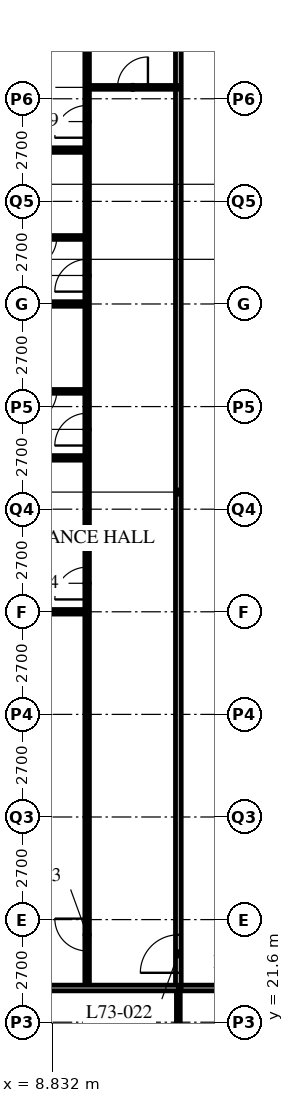
"""IFC4 building model, lengths in metres.
Left out: names, types, materials, properties, quantities, classifications, styles, units other than length and angle.
Written with IfcOpenShell. Run it as: python <this file> out.ifc"""

import sys

from ifc_helpers import new_model, si_unit, direction, frame, frame_2d, origin, place, context, subcontext, project, spatial, rectangle, extrude, element, fill, save


model = new_model("IFC4")
c1 = context("Model", 3, precision=1e-05, world=origin(), true_north=direction((0.0, 1.0)))
c2 = subcontext(c1, "Body", "Model", "MODEL_VIEW")
j1 = project(units=[si_unit("LENGTHUNIT", "METRE"), si_unit("PLANEANGLEUNIT", "RADIAN")], contexts=[c1])
p1 = place(None, origin())
s1 = spatial("IfcSite", under=j1, at=p1, CompositionType="ELEMENT")
p2 = place(p1, origin())
s2 = spatial("IfcBuilding", under=s1, at=p2, CompositionType="ELEMENT")
p3 = place(p2, frame((0.0, 0.0, 285.3)))
s3 = spatial("IfcBuildingStorey", under=s2, at=p3, CompositionType="ELEMENT", Elevation=285.3)
p4 = place(p3, frame((12.15, 22.5, 0.0), z_axis=(0.0, 0.0, 1.0), x_axis=(1.0, 0.0, 0.0)))
e1 = element("IfcWall", 1, at=p4, inside=s3, PredefinedType="PARTITIONING", context=c2, shape_type="SweptSolid", body=[
    extrude(rectangle(XDim=24.3, YDim=0.15, at=frame_2d((12.15, 0.0))), origin(), (0.0, 0.0, 1.0), 3.69),
])
p5 = place(p4, frame((4.45, 0.0, 0.0)))
e2 = element("IfcOpeningElement", 2, at=p5, cuts=e1, PredefinedType="OPENING", context=c2, shape_type="SweptSolid", body=[
    extrude(rectangle(XDim=1.0, YDim=2.1, at=frame_2d((0.5, 1.05))), frame((0.0, 0.085, 0.0), z_axis=(0.0, -1.0, 0.0), x_axis=(1.0, 0.0, 0.0)), (0.0, 0.0, 1.0), 0.17),
])
p6 = place(p4, frame((22.6, 0.0, 0.0)))
e3 = element("IfcOpeningElement", 3, at=p6, cuts=e1, PredefinedType="OPENING", context=c2, shape_type="SweptSolid", body=[
    extrude(rectangle(XDim=1.0, YDim=2.1, at=frame_2d((0.5, 1.05))), frame((0.0, 0.085, 0.0), z_axis=(0.0, -1.0, 0.0), x_axis=(1.0, 0.0, 0.0)), (0.0, 0.0, 1.0), 0.17),
])
p7 = place(p4, frame((2.625, 0.0, 0.0)))
e4 = element("IfcOpeningElement", 4, at=p7, cuts=e1, PredefinedType="OPENING", context=c2, shape_type="SweptSolid", body=[
    extrude(rectangle(XDim=1.0, YDim=2.1, at=frame_2d((0.5, 1.05))), frame((0.0, 0.085, 0.0), z_axis=(0.0, -1.0, 0.0), x_axis=(1.0, 0.0, 0.0)), (0.0, 0.0, 1.0), 0.17),
])
p8 = place(p3, frame((12.15, 22.5, 0.0), z_axis=(0.0, 0.0, 1.0), x_axis=(0.0, 1.0, 0.0)))
e5 = element("IfcWall", 5, at=p8, inside=s3, PredefinedType="PARTITIONING", context=c2, shape_type="SweptSolid", body=[
    extrude(rectangle(XDim=26.1, YDim=0.15, at=frame_2d((13.05, 0.0))), origin(), (0.0, 0.0, 1.0), 3.69),
])
p9 = place(p8, frame((0.4, 0.0, 0.0)))
e6 = element("IfcOpeningElement", 6, at=p9, cuts=e5, PredefinedType="OPENING", context=c2, shape_type="SweptSolid", body=[
    extrude(rectangle(XDim=1.0, YDim=2.1, at=frame_2d((0.5, 1.05))), frame((0.0, 0.085, 0.0), z_axis=(0.0, -1.0, 0.0), x_axis=(1.0, 0.0, 0.0)), (0.0, 0.0, 1.0), 0.17),
])
p10 = place(p3, frame((9.75, 22.5, 0.0), z_axis=(0.0, 0.0, 1.0), x_axis=(0.0, 1.0, 0.0)))
e7 = element("IfcWall", 7, at=p10, inside=s3, PredefinedType="PARTITIONING", context=c2, shape_type="SweptSolid", body=[
    extrude(rectangle(XDim=26.1, YDim=0.12, at=frame_2d((13.05, 0.0))), origin(), (0.0, 0.0, 1.0), 3.69),
])
p11 = place(p10, frame((0.975, 0.0, 0.0)))
e8 = element("IfcOpeningElement", 8, at=p11, cuts=e7, PredefinedType="OPENING", context=c2, shape_type="SweptSolid", body=[
    extrude(rectangle(XDim=0.85, YDim=2.1, at=frame_2d((0.425, 1.05))), frame((0.0, 0.07, 0.0), z_axis=(0.0, -1.0, 0.0), x_axis=(1.0, 0.0, 0.0)), (0.0, 0.0, 1.0), 0.14),
])
p12 = place(p10, frame((10.225, 0.0, 0.0)))
e9 = element("IfcOpeningElement", 9, at=p12, cuts=e7, PredefinedType="OPENING", context=c2, shape_type="SweptSolid", body=[
    extrude(rectangle(XDim=0.85, YDim=2.1, at=frame_2d((0.425, 1.05))), frame((0.0, 0.07, 0.0), z_axis=(0.0, -1.0, 0.0), x_axis=(1.0, 0.0, 0.0)), (0.0, 0.0, 1.0), 0.14),
])
p13 = place(p10, frame((14.275, 0.0, 0.0)))
e10 = element("IfcOpeningElement", 10, at=p13, cuts=e7, PredefinedType="OPENING", context=c2, shape_type="SweptSolid", body=[
    extrude(rectangle(XDim=0.85, YDim=2.1, at=frame_2d((0.425, 1.05))), frame((0.0, 0.07, 0.0), z_axis=(0.0, -1.0, 0.0), x_axis=(1.0, 0.0, 0.0)), (0.0, 0.0, 1.0), 0.14),
])
p14 = place(p10, frame((18.325, 0.0, 0.0)))
e11 = element("IfcOpeningElement", 11, at=p14, cuts=e7, PredefinedType="OPENING", context=c2, shape_type="SweptSolid", body=[
    extrude(rectangle(XDim=0.85, YDim=2.1, at=frame_2d((0.425, 1.05))), frame((0.0, 0.07, 0.0), z_axis=(0.0, -1.0, 0.0), x_axis=(1.0, 0.0, 0.0)), (0.0, 0.0, 1.0), 0.14),
])
p15 = place(p10, frame((22.375, 0.0, 0.0)))
e12 = element("IfcOpeningElement", 12, at=p15, cuts=e7, PredefinedType="OPENING", context=c2, shape_type="SweptSolid", body=[
    extrude(rectangle(XDim=0.85, YDim=2.1, at=frame_2d((0.425, 1.05))), frame((0.0, 0.07, 0.0), z_axis=(0.0, -1.0, 0.0), x_axis=(1.0, 0.0, 0.0)), (0.0, 0.0, 1.0), 0.14),
])
p16 = place(p3, frame((12.15, 46.2, 0.0), z_axis=(0.0, 0.0, 1.0), x_axis=(-1.0, 0.0, 0.0)))
e13 = element("IfcWall", 13, at=p16, inside=s3, PredefinedType="PARTITIONING", context=c2, shape_type="SweptSolid", body=[
    extrude(rectangle(XDim=2.4, YDim=0.1, at=frame_2d((1.2, 0.0))), origin(), (0.0, 0.0, 1.0), 3.69),
])
p17 = place(p16, frame((0.8, 0.0, 0.0)))
e14 = element("IfcOpeningElement", 14, at=p17, cuts=e13, PredefinedType="OPENING", context=c2, shape_type="SweptSolid", body=[
    extrude(rectangle(XDim=0.8, YDim=2.1, at=frame_2d((0.4, 1.05))), frame((0.0, 0.06, 0.0), z_axis=(0.0, -1.0, 0.0), x_axis=(1.0, 0.0, 0.0)), (0.0, 0.0, 1.0), 0.12),
])
p18 = place(p3, frame((9.75, 32.4, 0.0), z_axis=(0.0, 0.0, 1.0), x_axis=(-1.0, 0.0, 0.0)))
e15 = element("IfcWall", 15, at=p18, inside=s3, PredefinedType="PARTITIONING", context=c2, shape_type="SweptSolid", body=[
    extrude(rectangle(XDim=9.45, YDim=0.12, at=frame_2d((4.725, 0.0))), origin(), (0.0, 0.0, 1.0), 3.078),
])
p19 = place(p3, frame((9.75, 38.2, 0.0), z_axis=(0.0, 0.0, 1.0), x_axis=(-1.0, 0.0, 0.0)))
e16 = element("IfcWall", 16, at=p19, inside=s3, PredefinedType="PARTITIONING", context=c2, shape_type="SweptSolid", body=[
    extrude(rectangle(XDim=2.4, YDim=0.1, at=frame_2d((1.2, 0.0))), origin(), (0.0, 0.0, 1.0), 3.69),
])
p20 = place(p19, frame((0.8, 0.0, 0.0)))
e17 = element("IfcOpeningElement", 17, at=p20, cuts=e16, PredefinedType="OPENING", context=c2, shape_type="SweptSolid", body=[
    extrude(rectangle(XDim=0.8, YDim=2.1, at=frame_2d((0.4, 1.05))), frame((0.0, 0.06, 0.0), z_axis=(0.0, -1.0, 0.0), x_axis=(1.0, 0.0, 0.0)), (0.0, 0.0, 1.0), 0.12),
])
p21 = place(p3, frame((9.75, 36.45, 0.0), z_axis=(0.0, 0.0, 1.0), x_axis=(-1.0, 0.0, 0.0)))
e18 = element("IfcWall", 18, at=p21, inside=s3, PredefinedType="PARTITIONING", context=c2, shape_type="SweptSolid", body=[
    extrude(rectangle(XDim=9.45, YDim=0.12, at=frame_2d((4.725, 0.0))), origin(), (0.0, 0.0, 1.0), 3.69),
])
p22 = place(p3, frame((9.75, 42.25, 0.0), z_axis=(0.0, 0.0, 1.0), x_axis=(-1.0, 0.0, 0.0)))
e19 = element("IfcWall", 19, at=p22, inside=s3, PredefinedType="PARTITIONING", context=c2, shape_type="SweptSolid", body=[
    extrude(rectangle(XDim=2.4, YDim=0.1, at=frame_2d((1.2, 0.0))), origin(), (0.0, 0.0, 1.0), 3.69),
])
p23 = place(p22, frame((0.8, 0.0, 0.0)))
e20 = element("IfcOpeningElement", 20, at=p23, cuts=e19, PredefinedType="OPENING", context=c2, shape_type="SweptSolid", body=[
    extrude(rectangle(XDim=0.8, YDim=2.1, at=frame_2d((0.4, 1.05))), frame((0.0, 0.06, 0.0), z_axis=(0.0, -1.0, 0.0), x_axis=(1.0, 0.0, 0.0)), (0.0, 0.0, 1.0), 0.12),
])
p24 = place(p3, frame((9.75, 40.5, 0.0), z_axis=(0.0, 0.0, 1.0), x_axis=(-1.0, 0.0, 0.0)))
e21 = element("IfcWall", 21, at=p24, inside=s3, PredefinedType="PARTITIONING", context=c2, shape_type="SweptSolid", body=[
    extrude(rectangle(XDim=9.45, YDim=0.12, at=frame_2d((4.725, 0.0))), origin(), (0.0, 0.0, 1.0), 3.078),
])
p25 = place(p3, frame((9.75, 44.55, 0.0), z_axis=(0.0, 0.0, 1.0), x_axis=(-1.0, 0.0, 0.0)))
e22 = element("IfcWall", 22, at=p25, inside=s3, PredefinedType="PARTITIONING", context=c2, shape_type="SweptSolid", body=[
    extrude(rectangle(XDim=9.45, YDim=0.12, at=frame_2d((4.725, 0.0))), origin(), (0.0, 0.0, 1.0), 3.69),
])
p26 = place(p3, frame((12.15, 22.5, 0.0), z_axis=(0.0, 0.0, 1.0), x_axis=(0.0, -1.0, 0.0)))
e23 = element("IfcWall", 23, at=p26, inside=s3, PredefinedType="PARTITIONING", context=c2, shape_type="SweptSolid", body=[
    extrude(rectangle(XDim=2.4, YDim=0.1, at=frame_2d((1.2, 0.0))), origin(), (0.0, 0.0, 1.0), 3.69),
])
p27 = place(p3, frame((4.35, 22.5, 0.0), z_axis=(0.0, 0.0, 1.0), x_axis=(1.0, 0.0, 0.0)))
e24 = element("IfcWall", 24, at=p27, inside=s3, PredefinedType="PARTITIONING", context=c2, shape_type="SweptSolid", body=[
    extrude(rectangle(XDim=7.8, YDim=0.15, at=frame_2d((3.9, 0.0))), origin(), (0.0, 0.0, 1.0), 3.69),
])
p28 = place(p17, origin())
e25 = element("IfcDoor", 25, at=p28, inside=s3, OperationType="SINGLE_SWING_RIGHT", PredefinedType="DOOR", context=c2, shape_type="SweptSolid", body=[
    extrude(rectangle(XDim=0.8, YDim=2.1, at=frame_2d((0.4, 1.05))), frame((0.0, 0.025, 0.0), z_axis=(0.0, -1.0, 0.0), x_axis=(1.0, 0.0, 0.0)), (0.0, 0.0, 1.0), 0.05),
])
fill(e14, e25)
p29 = place(p9, origin())
e26 = element("IfcDoor", 26, at=p29, inside=s3, OperationType="SINGLE_SWING_LEFT", PredefinedType="DOOR", context=c2, shape_type="SweptSolid", body=[
    extrude(rectangle(XDim=1.0, YDim=2.1, at=frame_2d((0.5, 1.05))), frame((0.0, 0.025, 0.0), z_axis=(0.0, -1.0, 0.0), x_axis=(1.0, 0.0, 0.0)), (0.0, 0.0, 1.0), 0.05),
])
fill(e6, e26)
p30 = place(p11, origin())
e27 = element("IfcDoor", 27, at=p30, inside=s3, OperationType="SINGLE_SWING_RIGHT", PredefinedType="DOOR", context=c2, shape_type="SweptSolid", body=[
    extrude(rectangle(XDim=0.85, YDim=2.1, at=frame_2d((0.425, 1.05))), frame((0.0, 0.025, 0.0), z_axis=(0.0, -1.0, 0.0), x_axis=(1.0, 0.0, 0.0)), (0.0, 0.0, 1.0), 0.05),
])
fill(e8, e27)
p31 = place(p12, origin())
e28 = element("IfcDoor", 28, at=p31, inside=s3, OperationType="SINGLE_SWING_LEFT", PredefinedType="DOOR", context=c2, shape_type="SweptSolid", body=[
    extrude(rectangle(XDim=0.85, YDim=2.1, at=frame_2d((0.425, 1.05))), frame((0.0, 0.025, 0.0), z_axis=(0.0, -1.0, 0.0), x_axis=(1.0, 0.0, 0.0)), (0.0, 0.0, 1.0), 0.05),
])
fill(e9, e28)
p32 = place(p20, origin())
e29 = element("IfcDoor", 29, at=p32, inside=s3, OperationType="SINGLE_SWING_RIGHT", PredefinedType="DOOR", context=c2, shape_type="SweptSolid", body=[
    extrude(rectangle(XDim=0.8, YDim=2.1, at=frame_2d((0.4, 1.05))), frame((0.0, 0.025, 0.0), z_axis=(0.0, -1.0, 0.0), x_axis=(1.0, 0.0, 0.0)), (0.0, 0.0, 1.0), 0.05),
])
fill(e17, e29)
p33 = place(p13, origin())
e30 = element("IfcDoor", 30, at=p33, inside=s3, OperationType="SINGLE_SWING_LEFT", PredefinedType="DOOR", context=c2, shape_type="SweptSolid", body=[
    extrude(rectangle(XDim=0.85, YDim=2.1, at=frame_2d((0.425, 1.05))), frame((0.0, 0.025, 0.0), z_axis=(0.0, -1.0, 0.0), x_axis=(1.0, 0.0, 0.0)), (0.0, 0.0, 1.0), 0.05),
])
fill(e10, e30)
p34 = place(p23, origin())
e31 = element("IfcDoor", 31, at=p34, inside=s3, OperationType="SINGLE_SWING_RIGHT", PredefinedType="DOOR", context=c2, shape_type="SweptSolid", body=[
    extrude(rectangle(XDim=0.8, YDim=2.1, at=frame_2d((0.4, 1.05))), frame((0.0, 0.025, 0.0), z_axis=(0.0, -1.0, 0.0), x_axis=(1.0, 0.0, 0.0)), (0.0, 0.0, 1.0), 0.05),
])
fill(e20, e31)
p35 = place(p14, origin())
e32 = element("IfcDoor", 32, at=p35, inside=s3, OperationType="SINGLE_SWING_LEFT", PredefinedType="DOOR", context=c2, shape_type="SweptSolid", body=[
    extrude(rectangle(XDim=0.85, YDim=2.1, at=frame_2d((0.425, 1.05))), frame((0.0, 0.025, 0.0), z_axis=(0.0, -1.0, 0.0), x_axis=(1.0, 0.0, 0.0)), (0.0, 0.0, 1.0), 0.05),
])
fill(e11, e32)
p36 = place(p15, origin())
e33 = element("IfcDoor", 33, at=p36, inside=s3, OperationType="SINGLE_SWING_LEFT", PredefinedType="DOOR", context=c2, shape_type="SweptSolid", body=[
    extrude(rectangle(XDim=0.85, YDim=2.1, at=frame_2d((0.425, 1.05))), frame((0.0, 0.025, 0.0), z_axis=(0.0, -1.0, 0.0), x_axis=(1.0, 0.0, 0.0)), (0.0, 0.0, 1.0), 0.05),
])
fill(e12, e33)
save(model, sys.argv[1])
